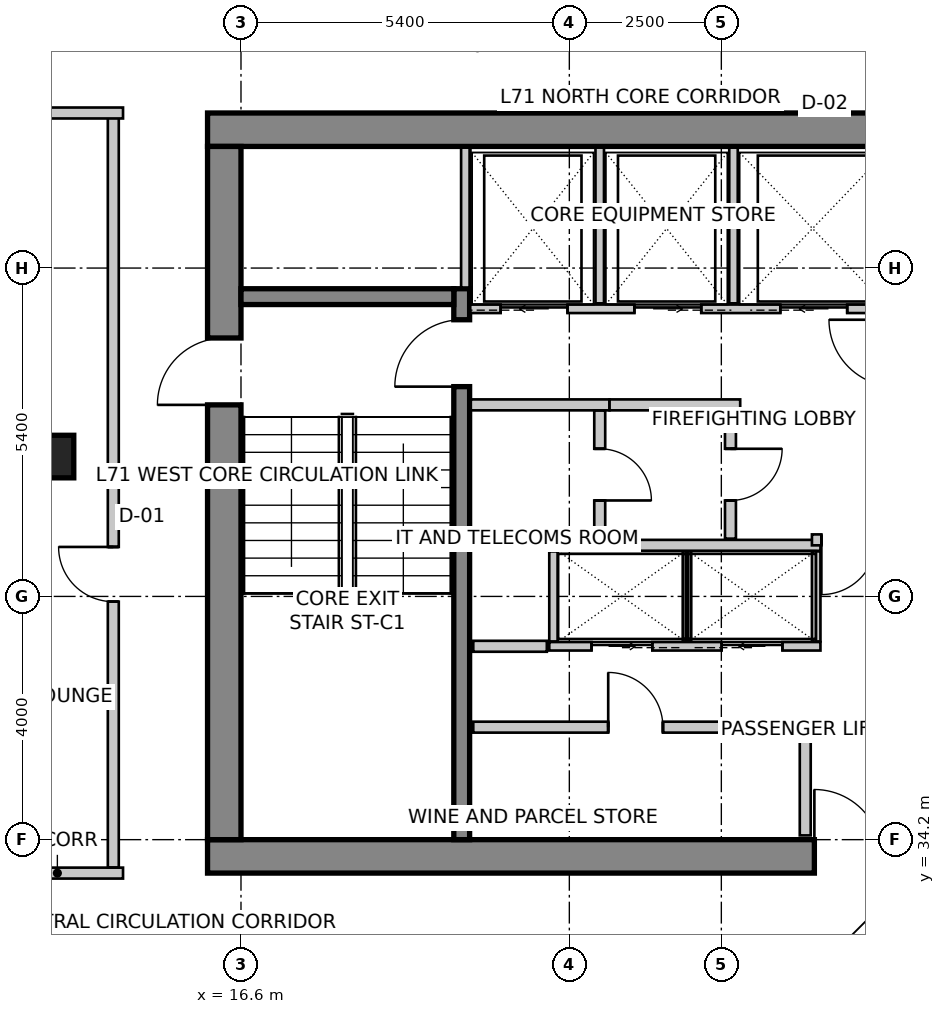
"""IFC4 building model, lengths in metres.
Left out: names, types, materials, properties, quantities, classifications, styles, units other than length and angle.
Written with IfcOpenShell. Run it as: python <this file> out.ifc"""

import sys

from ifc_helpers import new_model, si_unit, direction, frame, frame_2d, origin, origin_2d, place, context, subcontext, project, spatial, rectangle, extrude, source, transform, mapped, element, fill, save


model = new_model("IFC4")
c1 = context("Model", 3, precision=1e-05, world=origin(), true_north=direction((0.0, 1.0)))
c2 = subcontext(c1, "Body", "Model", "MODEL_VIEW")
j1 = project(units=[si_unit("LENGTHUNIT", "METRE"), si_unit("PLANEANGLEUNIT", "RADIAN")], contexts=[c1])
p1 = place(None, origin())
s1 = spatial("IfcSite", under=j1, at=p1, CompositionType="ELEMENT")
p2 = place(p1, origin())
s2 = spatial("IfcBuilding", under=s1, at=p2, CompositionType="ELEMENT")
p3 = place(p2, frame((0.0, 0.0, 278.1)))
s3 = spatial("IfcBuildingStorey", under=s2, at=p3, CompositionType="ELEMENT", Elevation=278.1)
p4 = place(p3, frame((16.05, 45.875, 0.0), z_axis=(0.0, 0.0, 1.0), x_axis=(1.0, 0.0, 0.0)))
e1 = element("IfcWall", 1, at=p4, inside=s3, PredefinedType="SHEAR", context=c2, shape_type="SweptSolid", body=[
    extrude(rectangle(XDim=15.5, YDim=0.55, at=frame_2d((7.75, 0.0))), origin(), (0.0, 0.0, 1.0), 3.6),
])
p5 = place(p3, frame((16.05, 33.925, 0.0), z_axis=(0.0, 0.0, 1.0), x_axis=(1.0, 0.0, 0.0)))
e2 = element("IfcWall", 2, at=p5, inside=s3, PredefinedType="SHEAR", context=c2, shape_type="SweptSolid", body=[
    extrude(rectangle(XDim=15.5, YDim=0.55, at=frame_2d((7.75, 0.0))), origin(), (0.0, 0.0, 1.0), 3.6),
])
m1 = source(origin(), c2, "Body", "SweptSolid", [
    extrude(rectangle(XDim=1.1, YDim=2.15, at=frame_2d((0.55, 1.075))), frame((0.0, 0.285, 0.0), z_axis=(0.0, -1.0, 0.0), x_axis=(1.0, 0.0, 0.0)), (0.0, 0.0, 1.0), 0.57),
])
p6 = place(p5, frame((9.98, 0.0, 0.0)))
e3 = element("IfcOpeningElement", 3, at=p6, cuts=e2, PredefinedType="OPENING", context=c2, shape_type="MappedRepresentation", body=[
    mapped(m1, transform((0.0, 0.0, 0.0), scale=1.0)),
])
p7 = place(p3, frame((16.325, 34.2, 0.0), z_axis=(0.0, 0.0, 1.0), x_axis=(0.0, 1.0, 0.0)))
e4 = element("IfcWall", 4, at=p7, inside=s3, PredefinedType="SHEAR", context=c2, shape_type="SweptSolid", body=[
    extrude(rectangle(XDim=11.4, YDim=0.55, at=frame_2d((5.7, 0.0))), origin(), (0.0, 0.0, 1.0), 3.6),
])
p8 = place(p7, frame((7.15, 0.0, 0.0)))
e5 = element("IfcOpeningElement", 5, at=p8, cuts=e4, PredefinedType="OPENING", context=c2, shape_type="MappedRepresentation", body=[
    mapped(m1, transform((0.0, 0.0, 0.0), scale=1.0)),
])
p9 = place(p3, frame((20.23, 34.2, 0.0), z_axis=(0.0, 0.0, 1.0), x_axis=(0.0, 1.0, 0.0)))
e6 = element("IfcWall", 6, at=p9, inside=s3, PredefinedType="SHEAR", context=c2, shape_type="SweptSolid", body=[
    extrude(rectangle(XDim=9.06, YDim=0.26, at=frame_2d((4.53, 0.0))), origin(), (0.0, 0.0, 1.0), 3.6),
])
m2 = source(origin(), c2, "Body", "SweptSolid", [
    extrude(rectangle(XDim=1.1, YDim=2.15, at=frame_2d((0.55, 1.075))), frame((0.0, 0.14, 0.0), z_axis=(0.0, -1.0, 0.0), x_axis=(1.0, 0.0, 0.0)), (0.0, 0.0, 1.0), 0.28),
])
p10 = place(p9, frame((7.45, 0.0, 0.0)))
e7 = element("IfcOpeningElement", 7, at=p10, cuts=e6, PredefinedType="OPENING", context=c2, shape_type="MappedRepresentation", body=[
    mapped(m2, transform((0.0, 0.0, 0.0), scale=1.0)),
])
p11 = place(p3, frame((16.6, 43.13, 0.0), z_axis=(0.0, 0.0, 1.0), x_axis=(1.0, 0.0, 0.0)))
e8 = element("IfcWall", 8, at=p11, inside=s3, PredefinedType="SHEAR", context=c2, shape_type="SweptSolid", body=[
    extrude(rectangle(XDim=3.5, YDim=0.26, at=frame_2d((1.75, 0.0))), origin(), (0.0, 0.0, 1.0), 3.6),
])
m3 = source(origin(), c2, "Body", "SweptSolid", [
    extrude(rectangle(XDim=0.7, YDim=0.7, at=origin_2d()), origin(), (0.0, 0.0, 1.0), 3.6),
])
p12 = place(p3, frame((13.5, 40.5, 0.0), z_axis=(0.0, 0.0, 1.0), x_axis=(1.0, 0.0, 0.0)))
e9 = element("IfcColumn", 9, at=p12, inside=s3, PredefinedType="COLUMN", context=c2, shape_type="MappedRepresentation", body=[
    mapped(m3, transform((0.0, 0.0, 0.0), scale=1.0)),
])
p13 = place(p3, frame((25.828, 31.6, 0.0), z_axis=(0.0, 0.0, 1.0), x_axis=(0.707106781187, 0.707106781187, 0.0)))
e10 = element("IfcWall", 10, at=p13, inside=s3, PredefinedType="SOLIDWALL", context=c2, shape_type="SweptSolid", body=[
    extrude(rectangle(XDim=2.907, YDim=0.3, at=frame_2d((1.454, 0.0))), origin(), (0.0, 0.0, 1.0), 3.35),
])
m4 = source(origin(), c2, "Body", "SweptSolid", [
    extrude(rectangle(XDim=1.8, YDim=2.1, at=frame_2d((0.9, 1.05))), frame((0.0, 0.16, 0.0), z_axis=(0.0, -1.0, 0.0), x_axis=(1.0, 0.0, 0.0)), (0.0, 0.0, 1.0), 0.32),
])
p14 = place(p13, frame((0.729, 0.0, 0.85)))
e11 = element("IfcOpeningElement", 11, at=p14, cuts=e10, PredefinedType="OPENING", context=c2, shape_type="MappedRepresentation", body=[
    mapped(m4, transform((0.0, 0.0, 0.0), scale=1.0)),
])
p15 = place(p3, frame((21.873, 52.741, 0.0), z_axis=(0.0, 0.0, 1.0), x_axis=(-0.843661487732, -0.536875492193, 0.0)))
e12 = element("IfcWall", 12, at=p15, inside=s3, PredefinedType="SOLIDWALL", context=c2, shape_type="SweptSolid", body=[
    extrude(rectangle(XDim=10.282, YDim=0.3, at=frame_2d((5.141, 0.0))), origin(), (0.0, 0.0, 1.0), 3.35),
])
m5 = source(origin(), c2, "Body", "SweptSolid", [
    extrude(rectangle(XDim=2.4, YDim=2.2, at=frame_2d((1.2, 1.1))), frame((0.0, 0.16, 0.0), z_axis=(0.0, -1.0, 0.0), x_axis=(1.0, 0.0, 0.0)), (0.0, 0.0, 1.0), 0.32),
])
p16 = place(p15, frame((1.26, 0.0, 0.85)))
e13 = element("IfcOpeningElement", 13, at=p16, cuts=e12, PredefinedType="OPENING", context=c2, shape_type="MappedRepresentation", body=[
    mapped(m5, transform((0.0, 0.0, 0.0), scale=1.0)),
])
m6 = source(origin(), c2, "Body", "SweptSolid", [
    extrude(rectangle(XDim=2.1, YDim=2.0, at=frame_2d((1.05, 1.0))), frame((0.0, 0.16, 0.0), z_axis=(0.0, -1.0, 0.0), x_axis=(1.0, 0.0, 0.0)), (0.0, 0.0, 1.0), 0.32),
])
p17 = place(p15, frame((5.689, 0.0, 0.85)))
e14 = element("IfcOpeningElement", 14, at=p17, cuts=e12, PredefinedType="OPENING", context=c2, shape_type="MappedRepresentation", body=[
    mapped(m6, transform((0.0, 0.0, 0.0), scale=1.0)),
])
p18 = place(p3, frame((20.37, 42.93, 0.0), z_axis=(0.0, 0.0, 1.0), x_axis=(1.0, 0.0, 0.0)))
e15 = element("IfcWall", 15, at=p18, inside=s3, PredefinedType="SOLIDWALL", context=c2, shape_type="SweptSolid", body=[
    extrude(rectangle(XDim=6.86, YDim=0.14, at=frame_2d((3.43, 0.0))), origin(), (0.0, 0.0, 1.0), 3.35),
])
m7 = source(origin(), c2, "Body", "SweptSolid", [
    extrude(rectangle(XDim=1.1, YDim=2.15, at=frame_2d((0.55, 1.075))), frame((0.0, 0.08, 0.0), z_axis=(0.0, -1.0, 0.0), x_axis=(1.0, 0.0, 0.0)), (0.0, 0.0, 1.0), 0.16),
])
p19 = place(p18, frame((0.5, 0.0, 0.0)))
e16 = element("IfcOpeningElement", 16, at=p19, cuts=e15, PredefinedType="OPENING", context=c2, shape_type="MappedRepresentation", body=[
    mapped(m7, transform((0.0, 0.0, 0.0), scale=1.0)),
])
p20 = place(p18, frame((2.7, 0.0, 0.0)))
e17 = element("IfcOpeningElement", 17, at=p20, cuts=e15, PredefinedType="OPENING", context=c2, shape_type="MappedRepresentation", body=[
    mapped(m7, transform((0.0, 0.0, 0.0), scale=1.0)),
])
p21 = place(p18, frame((5.1, 0.0, 0.0)))
e18 = element("IfcOpeningElement", 18, at=p21, cuts=e15, PredefinedType="OPENING", context=c2, shape_type="MappedRepresentation", body=[
    mapped(m7, transform((0.0, 0.0, 0.0), scale=1.0)),
])
p22 = place(p3, frame((20.29, 43.28, 0.0), z_axis=(0.0, 0.0, 1.0), x_axis=(0.0, 1.0, 0.0)))
e19 = element("IfcWall", 19, at=p22, inside=s3, PredefinedType="SOLIDWALL", context=c2, shape_type="SweptSolid", body=[
    extrude(rectangle(XDim=2.3, YDim=0.14, at=frame_2d((1.15, 0.0))), origin(), (0.0, 0.0, 1.0), 3.35),
])
for number, where, z_axis, x_axis in (
    (20, (22.5, 43.02, 0.0), (0.0, 0.0, 1.0), (0.0, 1.0, 0.0)),
    (21, (24.7, 43.02, 0.0), (0.0, 0.0, 1.0), (0.0, 1.0, 0.0)),
):
    element("IfcWall", number, at=place(p3, frame(where, z_axis=z_axis, x_axis=x_axis)), inside=s3, PredefinedType="SOLIDWALL", context=c2, shape_type="SweptSolid", body=[
        extrude(rectangle(XDim=2.56, YDim=0.14, at=frame_2d((1.28, 0.0))), origin(), (0.0, 0.0, 1.0), 3.35),
    ])
p23 = place(p3, frame((21.67, 37.38, 0.0), z_axis=(0.0, 0.0, 1.0), x_axis=(1.0, 0.0, 0.0)))
e22 = element("IfcWall", 22, at=p23, inside=s3, PredefinedType="SOLIDWALL", context=c2, shape_type="SweptSolid", body=[
    extrude(rectangle(XDim=4.46, YDim=0.14, at=frame_2d((2.23, 0.0))), origin(), (0.0, 0.0, 1.0), 3.35),
])
m8 = source(origin(), c2, "Body", "SweptSolid", [
    extrude(rectangle(XDim=1.0, YDim=2.15, at=frame_2d((0.5, 1.075))), frame((0.0, 0.08, 0.0), z_axis=(0.0, -1.0, 0.0), x_axis=(1.0, 0.0, 0.0)), (0.0, 0.0, 1.0), 0.16),
])
p24 = place(p23, frame((0.695, 0.0, 0.0)))
e23 = element("IfcOpeningElement", 23, at=p24, cuts=e22, PredefinedType="OPENING", context=c2, shape_type="MappedRepresentation", body=[
    mapped(m8, transform((0.0, 0.0, 0.0), scale=1.0)),
])
p25 = place(p23, frame((2.835, 0.0, 0.0)))
e24 = element("IfcOpeningElement", 24, at=p25, cuts=e22, PredefinedType="OPENING", context=c2, shape_type="MappedRepresentation", body=[
    mapped(m8, transform((0.0, 0.0, 0.0), scale=1.0)),
])
p26 = place(p3, frame((21.67, 39.04, 0.0), z_axis=(0.0, 0.0, 1.0), x_axis=(1.0, 0.0, 0.0)))
e25 = element("IfcWall", 25, at=p26, inside=s3, PredefinedType="SOLIDWALL", context=c2, shape_type="SweptSolid", body=[
    extrude(rectangle(XDim=4.46, YDim=0.18, at=frame_2d((2.23, 0.0))), origin(), (0.0, 0.0, 1.0), 3.35),
])
for number, where, z_axis, x_axis in (
    (26, (26.06, 37.46, 0.0), (0.0, 0.0, 1.0), (0.0, 1.0, 0.0)),
    (27, (21.74, 37.46, 0.0), (0.0, 0.0, 1.0), (0.0, 1.0, 0.0)),
    (28, (23.935, 37.46, 0.0), (0.0, 0.0, 1.0), (0.0, 1.0, 0.0)),
):
    element("IfcWall", number, at=place(p3, frame(where, z_axis=z_axis, x_axis=x_axis)), inside=s3, PredefinedType="SOLIDWALL", context=c2, shape_type="SweptSolid", body=[
        extrude(rectangle(XDim=1.48, YDim=0.14, at=frame_2d((0.74, 0.0))), origin(), (0.0, 0.0, 1.0), 3.35),
    ])
p27 = place(p3, frame((22.66, 41.35, 0.0), z_axis=(0.0, 0.0, 1.0), x_axis=(-1.0, 0.0, 0.0)))
e29 = element("IfcWall", 29, at=p27, inside=s3, PredefinedType="PARTITIONING", context=c2, shape_type="SweptSolid", body=[
    extrude(rectangle(XDim=2.28, YDim=0.18, at=frame_2d((1.14, 0.0))), origin(), (0.0, 0.0, 1.0), 3.35),
])
p28 = place(p3, frame((24.81, 41.35, 0.0), z_axis=(0.0, 0.0, 1.0), x_axis=(-1.0, 0.0, 0.0)))
e30 = element("IfcWall", 30, at=p28, inside=s3, PredefinedType="PARTITIONING", context=c2, shape_type="SweptSolid", body=[
    extrude(rectangle(XDim=2.148, YDim=0.18, at=frame_2d((1.074, 0.0))), origin(), (0.0, 0.0, 1.0), 3.35),
])
p29 = place(p3, frame((22.5, 41.256, 0.0), z_axis=(0.0, 0.0, 1.0), x_axis=(0.0, -1.0, 0.0)))
e31 = element("IfcWall", 31, at=p29, inside=s3, PredefinedType="PARTITIONING", context=c2, shape_type="SweptSolid", body=[
    extrude(rectangle(XDim=2.106, YDim=0.18, at=frame_2d((1.053, 0.0))), origin(), (0.0, 0.0, 1.0), 3.35),
])
m9 = source(origin(), c2, "Body", "SweptSolid", [
    extrude(rectangle(XDim=0.85, YDim=2.15, at=frame_2d((0.425, 1.075))), frame((0.0, 0.1, 0.0), z_axis=(0.0, -1.0, 0.0), x_axis=(1.0, 0.0, 0.0)), (0.0, 0.0, 1.0), 0.2),
])
p30 = place(p29, frame((0.628, 0.0, 0.0)))
e32 = element("IfcOpeningElement", 32, at=p30, cuts=e31, PredefinedType="OPENING", context=c2, shape_type="MappedRepresentation", body=[
    mapped(m9, transform((0.0, 0.0, 0.0), scale=1.0)),
])
p31 = place(p3, frame((21.63, 37.38, 0.0), z_axis=(0.0, 0.0, 1.0), x_axis=(-1.0, 0.0, 0.0)))
e33 = element("IfcWall", 33, at=p31, inside=s3, PredefinedType="PARTITIONING", context=c2, shape_type="SweptSolid", body=[
    extrude(rectangle(XDim=1.21, YDim=0.18, at=frame_2d((0.605, 0.0))), origin(), (0.0, 0.0, 1.0), 3.35),
])
p32 = place(p3, frame((24.65, 41.256, 0.0), z_axis=(0.0, 0.0, 1.0), x_axis=(0.0, -1.0, 0.0)))
e34 = element("IfcWall", 34, at=p32, inside=s3, PredefinedType="PARTITIONING", context=c2, shape_type="SweptSolid", body=[
    extrude(rectangle(XDim=2.106, YDim=0.18, at=frame_2d((1.053, 0.0))), origin(), (0.0, 0.0, 1.0), 3.35),
])
p33 = place(p32, frame((0.628, 0.0, 0.0)))
e35 = element("IfcOpeningElement", 35, at=p33, cuts=e34, PredefinedType="OPENING", context=c2, shape_type="MappedRepresentation", body=[
    mapped(m9, transform((0.0, 0.0, 0.0), scale=1.0)),
])
p34 = place(p3, frame((27.2, 39.13, 0.0), z_axis=(0.0, 0.0, 1.0), x_axis=(-1.0, 0.0, 0.0)))
e36 = element("IfcWall", 36, at=p34, inside=s3, PredefinedType="PARTITIONING", context=c2, shape_type="SweptSolid", body=[
    extrude(rectangle(XDim=1.21, YDim=0.18, at=frame_2d((0.605, 0.0))), origin(), (0.0, 0.0, 1.0), 3.35),
])
m10 = source(origin(), c2, "Body", "SweptSolid", [
    extrude(rectangle(XDim=0.9, YDim=2.15, at=frame_2d((0.45, 1.075))), frame((0.0, 0.1, 0.0), z_axis=(0.0, -1.0, 0.0), x_axis=(1.0, 0.0, 0.0)), (0.0, 0.0, 1.0), 0.2),
])
p35 = place(p34, frame((0.155, 0.0, 0.0)))
e37 = element("IfcOpeningElement", 37, at=p35, cuts=e36, PredefinedType="OPENING", context=c2, shape_type="MappedRepresentation", body=[
    mapped(m10, transform((0.0, 0.0, 0.0), scale=1.0)),
])
p36 = place(p3, frame((20.42, 36.05, 0.0), z_axis=(0.0, 0.0, 1.0), x_axis=(1.0, 0.0, 0.0)))
e38 = element("IfcWall", 38, at=p36, inside=s3, PredefinedType="PARTITIONING", context=c2, shape_type="SweptSolid", body=[
    extrude(rectangle(XDim=5.46, YDim=0.18, at=frame_2d((2.73, 0.0))), origin(), (0.0, 0.0, 1.0), 3.35),
])
p37 = place(p36, frame((2.219, 0.0, 0.0)))
e39 = element("IfcOpeningElement", 39, at=p37, cuts=e38, PredefinedType="OPENING", context=c2, shape_type="MappedRepresentation", body=[
    mapped(m10, transform((0.0, 0.0, 0.0), scale=1.0)),
])
p38 = place(p3, frame((25.88, 35.956, 0.0), z_axis=(0.0, 0.0, 1.0), x_axis=(0.0, -1.0, 0.0)))
e40 = element("IfcWall", 40, at=p38, inside=s3, PredefinedType="PARTITIONING", context=c2, shape_type="SweptSolid", body=[
    extrude(rectangle(XDim=1.686, YDim=0.18, at=frame_2d((0.843, 0.0))), origin(), (0.0, 0.0, 1.0), 2.642),
])
p39 = place(p3, frame((12.5, 33.65, 0.0), z_axis=(0.0, 0.0, 1.0), x_axis=(1.0, 0.0, 0.0)))
e41 = element("IfcWall", 41, at=p39, inside=s3, PredefinedType="PARTITIONING", context=c2, shape_type="SweptSolid", body=[
    extrude(rectangle(XDim=2.16, YDim=0.18, at=frame_2d((1.08, 0.0))), origin(), (0.0, 0.0, 1.0), 3.35),
])
p40 = place(p3, frame((14.5, 33.744, 0.0), z_axis=(0.0, 0.0, 1.0), x_axis=(0.0, 1.0, 0.0)))
e42 = element("IfcWall", 42, at=p40, inside=s3, PredefinedType="PARTITIONING", context=c2, shape_type="SweptSolid", body=[
    extrude(rectangle(XDim=12.406, YDim=0.18, at=frame_2d((6.203, 0.0))), origin(), (0.0, 0.0, 1.0), 3.35),
])
p41 = place(p40, frame((4.37, 0.0, 0.0)))
e43 = element("IfcOpeningElement", 43, at=p41, cuts=e42, PredefinedType="OPENING", context=c2, shape_type="MappedRepresentation", body=[
    mapped(m10, transform((0.0, 0.0, 0.0), scale=1.0)),
])
p42 = place(p3, frame((14.66, 46.15, 0.0), z_axis=(0.0, 0.0, 1.0), x_axis=(-1.0, 0.0, 0.0)))
e44 = element("IfcWall", 44, at=p42, inside=s3, PredefinedType="PARTITIONING", context=c2, shape_type="SweptSolid", body=[
    extrude(rectangle(XDim=1.602, YDim=0.18, at=frame_2d((0.801, 0.0))), origin(), (0.0, 0.0, 1.0), 3.35),
])
m11 = source(origin(), c2, "Body", "SweptSolid", [
    extrude(rectangle(XDim=1.8, YDim=2.1, at=frame_2d((0.9, 1.05))), frame((0.0, -0.015, 0.0), z_axis=(0.0, -1.0, 0.0), x_axis=(1.0, 0.0, 0.0)), (0.0, 0.0, 1.0), 0.06),
])
p43 = place(p14, origin())
e45 = element("IfcWindow", 45, at=p43, inside=s3, PartitioningType="SINGLE_PANEL", PredefinedType="WINDOW", context=c2, shape_type="MappedRepresentation", body=[
    mapped(m11, transform((0.0, 0.0, 0.0), scale=1.0)),
])
fill(e11, e45)
m12 = source(origin(), c2, "Body", "SweptSolid", [
    extrude(rectangle(XDim=1.1, YDim=2.15, at=frame_2d((0.55, 1.075))), frame((0.0, 0.025, 0.0), z_axis=(0.0, -1.0, 0.0), x_axis=(1.0, 0.0, 0.0)), (0.0, 0.0, 1.0), 0.05),
])
p44 = place(p19, origin())
e46 = element("IfcDoor", 46, at=p44, inside=s3, OperationType="SLIDING_TO_LEFT", PredefinedType="DOOR", context=c2, shape_type="MappedRepresentation", body=[
    mapped(m12, transform((0.0, 0.0, 0.0), scale=1.0)),
])
fill(e16, e46)
p45 = place(p20, origin())
e47 = element("IfcDoor", 47, at=p45, inside=s3, OperationType="SLIDING_TO_RIGHT", PredefinedType="DOOR", context=c2, shape_type="MappedRepresentation", body=[
    mapped(m12, transform((0.0, 0.0, 0.0), scale=1.0)),
])
fill(e17, e47)
m13 = source(origin(), c2, "Body", "SweptSolid", [
    extrude(rectangle(XDim=1.1, YDim=2.15, at=frame_2d((0.55, 1.075))), frame((0.0, 0.025, 0.0), z_axis=(0.0, -1.0, 0.0), x_axis=(1.0, 0.0, 0.0)), (0.0, 0.0, 1.0), 0.05),
])
p46 = place(p21, origin())
e48 = element("IfcDoor", 48, at=p46, inside=s3, OperationType="SLIDING_TO_LEFT", PredefinedType="DOOR", context=c2, shape_type="MappedRepresentation", body=[
    mapped(m13, transform((0.0, 0.0, 0.0), scale=1.0)),
])
fill(e18, e48)
m14 = source(origin(), c2, "Body", "SweptSolid", [
    extrude(rectangle(XDim=1.0, YDim=2.15, at=frame_2d((0.5, 1.075))), frame((0.0, 0.025, 0.0), z_axis=(0.0, -1.0, 0.0), x_axis=(1.0, 0.0, 0.0)), (0.0, 0.0, 1.0), 0.05),
])
p47 = place(p24, origin())
e49 = element("IfcDoor", 49, at=p47, inside=s3, OperationType="SLIDING_TO_RIGHT", PredefinedType="DOOR", context=c2, shape_type="MappedRepresentation", body=[
    mapped(m14, transform((0.0, 0.0, 0.0), scale=1.0)),
])
fill(e23, e49)
p48 = place(p25, origin())
e50 = element("IfcDoor", 50, at=p48, inside=s3, OperationType="SLIDING_TO_LEFT", PredefinedType="DOOR", context=c2, shape_type="MappedRepresentation", body=[
    mapped(m14, transform((0.0, 0.0, 0.0), scale=1.0)),
])
fill(e24, e50)
m15 = source(origin(), c2, "Body", "SweptSolid", [
    extrude(rectangle(XDim=1.1, YDim=2.15, at=frame_2d((0.55, 1.075))), frame((0.0, 0.025, 0.0), z_axis=(0.0, -1.0, 0.0), x_axis=(1.0, 0.0, 0.0)), (0.0, 0.0, 1.0), 0.05),
])
p49 = place(p10, origin())
e51 = element("IfcDoor", 51, at=p49, inside=s3, OperationType="SINGLE_SWING_LEFT", PredefinedType="DOOR", context=c2, shape_type="MappedRepresentation", body=[
    mapped(m15, transform((0.0, 0.0, 0.0), scale=1.0)),
])
fill(e7, e51)
p50 = place(p8, origin())
e52 = element("IfcDoor", 52, at=p50, inside=s3, OperationType="SINGLE_SWING_LEFT", PredefinedType="DOOR", context=c2, shape_type="MappedRepresentation", body=[
    mapped(m15, transform((0.0, 0.0, 0.0), scale=1.0)),
])
fill(e5, e52)
p51 = place(p6, origin())
e53 = element("IfcDoor", 53, at=p51, inside=s3, OperationType="SINGLE_SWING_LEFT", PredefinedType="DOOR", context=c2, shape_type="MappedRepresentation", body=[
    mapped(m15, transform((0.0, 0.0, 0.0), scale=1.0)),
])
fill(e3, e53)
m16 = source(origin(), c2, "Body", "SweptSolid", [
    extrude(rectangle(XDim=0.85, YDim=2.15, at=frame_2d((0.425, 1.075))), frame((0.0, 0.025, 0.0), z_axis=(0.0, -1.0, 0.0), x_axis=(1.0, 0.0, 0.0)), (0.0, 0.0, 1.0), 0.05),
])
p52 = place(p30, origin())
e54 = element("IfcDoor", 54, at=p52, inside=s3, OperationType="SINGLE_SWING_RIGHT", PredefinedType="DOOR", context=c2, shape_type="MappedRepresentation", body=[
    mapped(m16, transform((0.0, 0.0, 0.0), scale=1.0)),
])
fill(e32, e54)
p53 = place(p33, origin())
e55 = element("IfcDoor", 55, at=p53, inside=s3, OperationType="SINGLE_SWING_LEFT", PredefinedType="DOOR", context=c2, shape_type="MappedRepresentation", body=[
    mapped(m16, transform((0.0, 0.0, 0.0), scale=1.0)),
])
fill(e35, e55)
m17 = source(origin(), c2, "Body", "SweptSolid", [
    extrude(rectangle(XDim=0.9, YDim=2.15, at=frame_2d((0.45, 1.075))), frame((0.0, 0.025, 0.0), z_axis=(0.0, -1.0, 0.0), x_axis=(1.0, 0.0, 0.0)), (0.0, 0.0, 1.0), 0.05),
])
p54 = place(p35, origin())
e56 = element("IfcDoor", 56, at=p54, inside=s3, OperationType="SINGLE_SWING_RIGHT", PredefinedType="DOOR", context=c2, shape_type="MappedRepresentation", body=[
    mapped(m17, transform((0.0, 0.0, 0.0), scale=1.0)),
])
fill(e37, e56)
p55 = place(p37, origin())
e57 = element("IfcDoor", 57, at=p55, inside=s3, OperationType="SINGLE_SWING_LEFT", PredefinedType="DOOR", context=c2, shape_type="MappedRepresentation", body=[
    mapped(m17, transform((0.0, 0.0, 0.0), scale=1.0)),
])
fill(e39, e57)
m18 = source(origin(), c2, "Body", "SweptSolid", [
    extrude(rectangle(XDim=0.9, YDim=2.15, at=frame_2d((0.45, 1.075))), frame((0.0, 0.025, 0.0), z_axis=(0.0, -1.0, 0.0), x_axis=(1.0, 0.0, 0.0)), (0.0, 0.0, 1.0), 0.05),
])
p56 = place(p41, origin())
e58 = element("IfcDoor", 58, at=p56, inside=s3, OperationType="SINGLE_SWING_RIGHT", PredefinedType="DOOR", context=c2, shape_type="MappedRepresentation", body=[
    mapped(m18, transform((0.0, 0.0, 0.0), scale=1.0)),
])
fill(e43, e58)
save(model, sys.argv[1])
